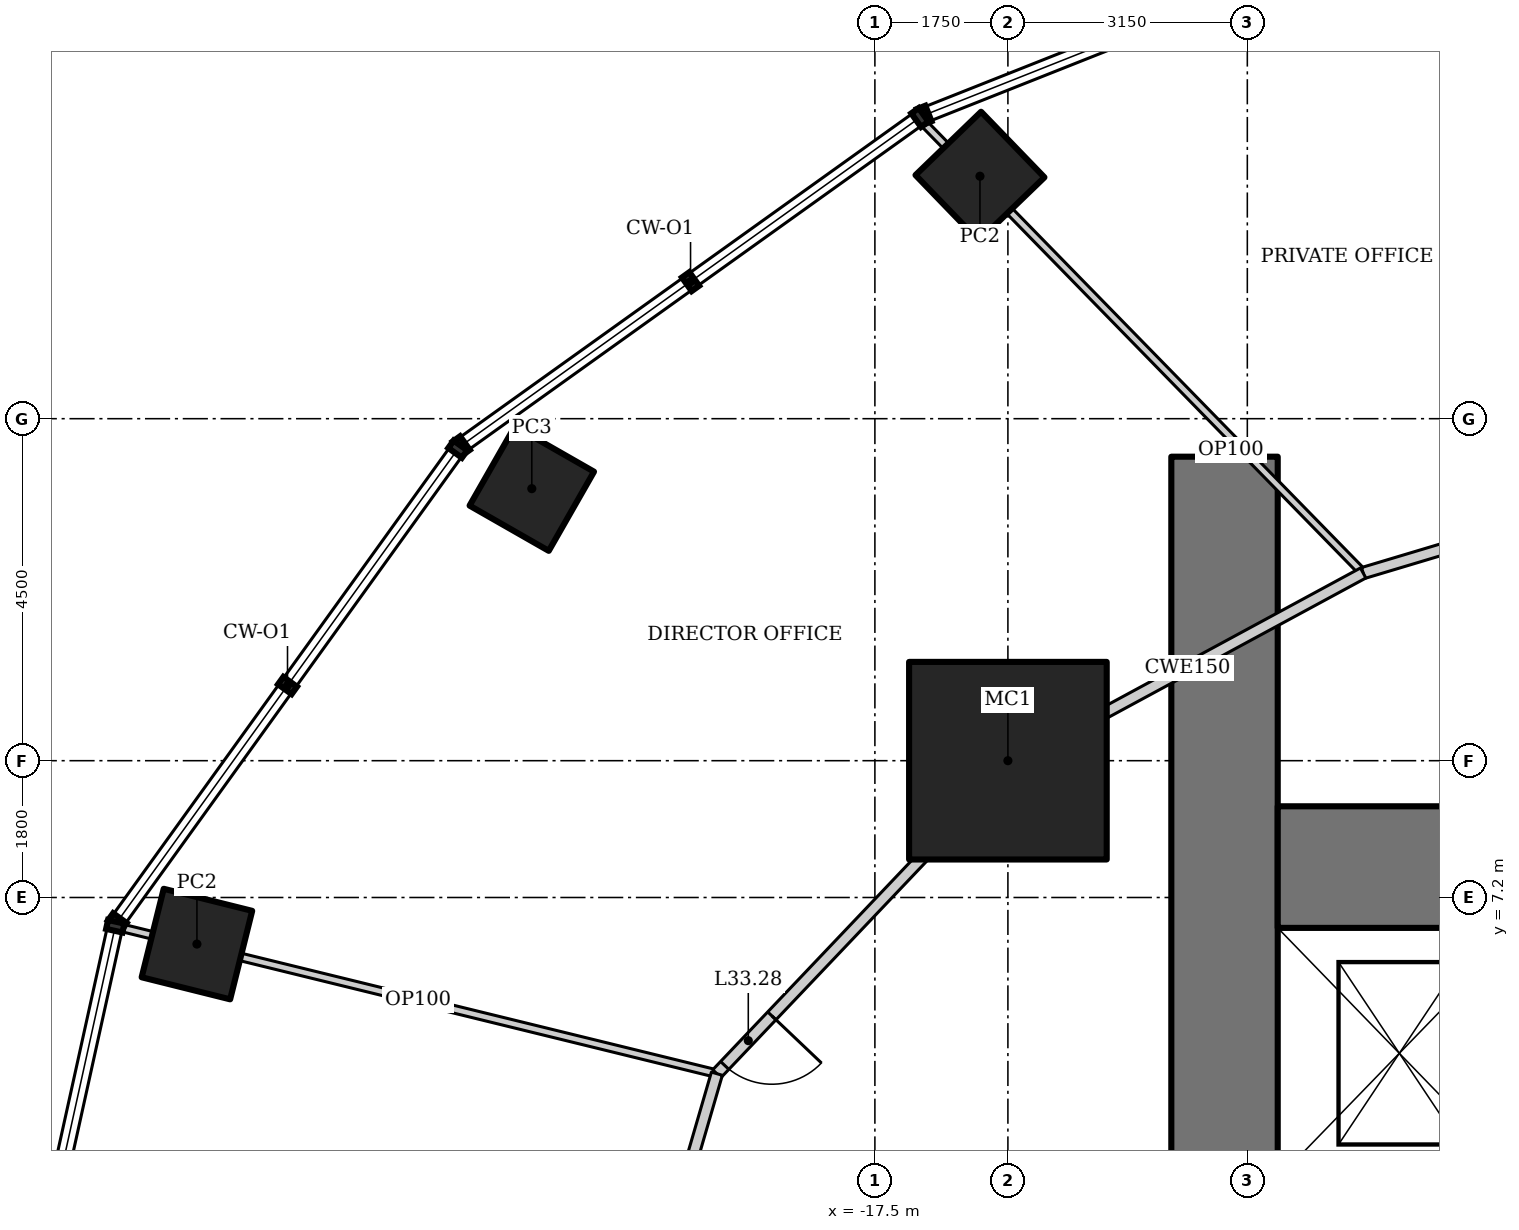
"""IFC4 building model, lengths in metres.
Left out: names, types, materials, properties, quantities, classifications, styles, units other than length and angle.
Written with IfcOpenShell. Run it as: python <this file> out.ifc"""

import sys

from ifc_helpers import new_model, si_unit, direction, frame, frame_2d, origin, origin_2d, place, context, subcontext, project, spatial, rectangle, hollow_rectangle, extrude, element, fill, save


model = new_model("IFC4")
c1 = context("Model", 3, precision=1e-05, world=origin(), true_north=direction((0.0, 1.0)))
c2 = subcontext(c1, "Body", "Model", "MODEL_VIEW")
j1 = project(units=[si_unit("LENGTHUNIT", "METRE"), si_unit("PLANEANGLEUNIT", "RADIAN")], contexts=[c1])
p1 = place(None, origin())
s1 = spatial("IfcSite", under=j1, at=p1, CompositionType="ELEMENT")
p2 = place(p1, origin())
s2 = spatial("IfcBuilding", under=s1, at=p2, CompositionType="ELEMENT")
p3 = place(p2, frame((0.0, 0.0, 142.6)))
s3 = spatial("IfcBuildingStorey", under=s2, at=p3, CompositionType="ELEMENT", Elevation=142.6)
p4 = place(p3, frame((-15.75, 9.0, 0.0), z_axis=(0.0, 0.0, 1.0), x_axis=(1.0, 0.0, 0.0)))
e1 = element("IfcColumn", 1, at=p4, inside=s3, PredefinedType="COLUMN", context=c2, shape_type="SweptSolid", body=[
    extrude(hollow_rectangle(XDim=2.6, YDim=2.6, WallThickness=0.13, at=origin_2d()), origin(), (0.0, 0.0, 1.0), 4.2),
])
for number, where, z_axis, x_axis in (
    (2, (-9.749, 19.133, 0.0), (0.0, 0.0, 1.0), (0.891, 0.454, 0.0)),
    (3, (-16.118, 16.69, 0.0), (0.0, 0.0, 1.0), (0.719, 0.695, 0.0)),
):
    element("IfcColumn", number, at=place(p3, frame(where, z_axis=z_axis, x_axis=x_axis)), inside=s3, PredefinedType="COLUMN", context=c2, shape_type="SweptSolid", body=[
        extrude(hollow_rectangle(XDim=1.2, YDim=1.2, WallThickness=0.1, at=origin_2d()), origin(), (0.0, 0.0, 1.0), 4.2),
    ])
p5 = place(p3, frame((-22.014, 12.579, 0.0), z_axis=(0.0, 0.0, 1.0), x_axis=(0.496139221777, 0.86824298017, 0.0)))
e4 = element("IfcColumn", 4, at=p5, inside=s3, PredefinedType="COLUMN", context=c2, shape_type="SweptSolid", body=[
    extrude(hollow_rectangle(XDim=1.2, YDim=1.2, WallThickness=0.12, at=origin_2d()), origin(), (0.0, 0.0, 1.0), 4.2),
])
p6 = place(p3, frame((-26.42, 6.587, 0.0), z_axis=(0.0, 0.0, 1.0), x_axis=(0.2419218956, 0.970295726276, 0.0)))
e5 = element("IfcColumn", 5, at=p6, inside=s3, PredefinedType="COLUMN", context=c2, shape_type="SweptSolid", body=[
    extrude(hollow_rectangle(XDim=1.2, YDim=1.2, WallThickness=0.1, at=origin_2d()), origin(), (0.0, 0.0, 1.0), 4.2),
])
p7 = place(p3, frame((-12.9, 13.0, 0.0), z_axis=(0.0, 0.0, 1.0), x_axis=(0.0, -1.0, 0.0)))
e6 = element("IfcWall", 6, at=p7, inside=s3, PredefinedType="SHEAR", context=c2, shape_type="SweptSolid", body=[
    extrude(rectangle(XDim=26.0, YDim=1.4, at=frame_2d((13.0, 0.0))), origin(), (0.0, 0.0, 1.0), 4.2),
])
p8 = place(p7, frame((12.1, 0.0, 0.0)))
e7 = element("IfcOpeningElement", 7, at=p8, cuts=e6, PredefinedType="OPENING", context=c2, shape_type="SweptSolid", body=[
    extrude(rectangle(XDim=1.8, YDim=2.1, at=frame_2d((0.9, 1.05))), frame((0.0, 0.71, 0.0), z_axis=(0.0, -1.0, 0.0), x_axis=(1.0, 0.0, 0.0)), (0.0, 0.0, 1.0), 1.42),
])
p9 = place(p3, frame((12.2, 7.6, 0.0), z_axis=(0.0, 0.0, 1.0), x_axis=(-1.0, 0.0, 0.0)))
e8 = element("IfcWall", 8, at=p9, inside=s3, PredefinedType="SHEAR", context=c2, shape_type="SweptSolid", body=[
    extrude(rectangle(XDim=24.4, YDim=1.6, at=frame_2d((12.2, 0.0))), origin(), (0.0, 0.0, 1.0), 4.2),
])
p10 = place(p3, frame((-10.253, 20.052, 0.0), z_axis=(0.0, 0.0, 1.0), x_axis=(0.457535449567, -0.889191381194, 0.0)))
e9 = element("IfcWall", 9, at=p10, inside=s3, PredefinedType="PARTITIONING", context=c2, shape_type="SweptSolid", body=[
    extrude(rectangle(XDim=8.123, YDim=0.1, at=frame_2d((4.061, 0.0))), origin(), (0.0, 0.0, 1.0), 3.349),
])
p11 = place(p3, frame((-16.882, 17.414, 0.0), z_axis=(0.0, 0.0, 1.0), x_axis=(0.698758056249, -0.715358077348, 0.0)))
e10 = element("IfcWall", 10, at=p11, inside=s3, PredefinedType="PARTITIONING", context=c2, shape_type="SweptSolid", body=[
    extrude(rectangle(XDim=8.31, YDim=0.1, at=frame_2d((4.155, 0.0))), origin(), (0.0, 0.0, 1.0), 3.321),
])
p12 = place(p3, frame((-27.441, 6.809, 0.0), z_axis=(0.0, 0.0, 1.0), x_axis=(0.971241251223, -0.238097526075, 0.0)))
e11 = element("IfcWall", 11, at=p12, inside=s3, PredefinedType="PARTITIONING", context=c2, shape_type="SweptSolid", body=[
    extrude(rectangle(XDim=8.094, YDim=0.1, at=frame_2d((4.047, 0.0))), origin(), (0.0, 0.0, 1.0), 3.113),
])
p13 = place(p3, frame((-6.537, 12.829, 0.0), z_axis=(0.0, 0.0, 1.0), x_axis=(-0.957933992798, -0.286988615527, 0.0)))
e12 = element("IfcWall", 12, at=p13, inside=s3, PredefinedType="PARTITIONING", context=c2, shape_type="SweptSolid", body=[
    extrude(rectangle(XDim=4.738, YDim=0.15, at=frame_2d((2.369, 0.0))), origin(), (0.0, 0.0, 1.0), 4.05),
])
p14 = place(p13, frame((1.607, 0.0, 0.0)))
e13 = element("IfcOpeningElement", 13, at=p14, cuts=e12, PredefinedType="OPENING", context=c2, shape_type="SweptSolid", body=[
    extrude(rectangle(XDim=0.9, YDim=2.1, at=frame_2d((0.45, 1.05))), frame((0.0, 0.085, 0.0), z_axis=(0.0, -1.0, 0.0), x_axis=(1.0, 0.0, 0.0)), (0.0, 0.0, 1.0), 0.17),
])
p15 = place(p3, frame((-11.076, 11.469, 0.0), z_axis=(0.0, 0.0, 1.0), x_axis=(-0.879436285334, -0.476016617397, 0.0)))
e14 = element("IfcWall", 14, at=p15, inside=s3, PredefinedType="PARTITIONING", context=c2, shape_type="SweptSolid", body=[
    extrude(rectangle(XDim=5.253, YDim=0.15, at=frame_2d((2.626, 0.0))), origin(), (0.0, 0.0, 1.0), 4.05),
])
p16 = place(p3, frame((-15.696, 8.969, 0.0), z_axis=(0.0, 0.0, 1.0), x_axis=(-0.688797257101, -0.72495402517, 0.0)))
e15 = element("IfcWall", 15, at=p16, inside=s3, PredefinedType="PARTITIONING", context=c2, shape_type="SweptSolid", body=[
    extrude(rectangle(XDim=5.638, YDim=0.15, at=frame_2d((2.819, 0.0))), origin(), (0.0, 0.0, 1.0), 4.05),
])
p17 = place(p16, frame((4.588, 0.0, 0.0)))
e16 = element("IfcOpeningElement", 16, at=p17, cuts=e15, PredefinedType="OPENING", context=c2, shape_type="SweptSolid", body=[
    extrude(rectangle(XDim=0.9, YDim=2.1, at=frame_2d((0.45, 1.05))), frame((0.0, 0.085, 0.0), z_axis=(0.0, -1.0, 0.0), x_axis=(1.0, 0.0, 0.0)), (0.0, 0.0, 1.0), 0.17),
])
p18 = place(p3, frame((-19.579, 4.882, 0.0), z_axis=(0.0, 0.0, 1.0), x_axis=(-0.279474430869, -0.960153134917, 0.0)))
e17 = element("IfcWall", 17, at=p18, inside=s3, PredefinedType="PARTITIONING", context=c2, shape_type="SweptSolid", body=[
    extrude(rectangle(XDim=5.084, YDim=0.15, at=frame_2d((2.542, 0.0))), origin(), (0.0, 0.0, 1.0), 4.05),
])
p19 = place(p3, frame((-12.9, 13.0, 0.0), z_axis=(0.0, 0.0, 1.0), x_axis=(0.714845300066, 0.699282630253, 0.0)))
e18 = element("IfcWall", 18, at=p19, inside=s3, PredefinedType="PARTITIONING", context=c2, shape_type="SweptSolid", body=[
    extrude(rectangle(XDim=0.235, YDim=0.1, at=frame_2d((0.118, 0.0))), origin(), (0.0, 0.0, 1.0), 4.05),
])
p20 = place(p17, origin())
e19 = element("IfcDoor", 19, at=p20, inside=s3, OperationType="SINGLE_SWING_LEFT", PredefinedType="DOOR", context=c2, shape_type="SweptSolid", body=[
    extrude(rectangle(XDim=0.9, YDim=2.1, at=frame_2d((0.45, 1.05))), frame((0.0, 0.025, 0.0), z_axis=(0.0, -1.0, 0.0), x_axis=(1.0, 0.0, 0.0)), (0.0, 0.0, 1.0), 0.05),
])
fill(e16, e19)
save(model, sys.argv[1])
